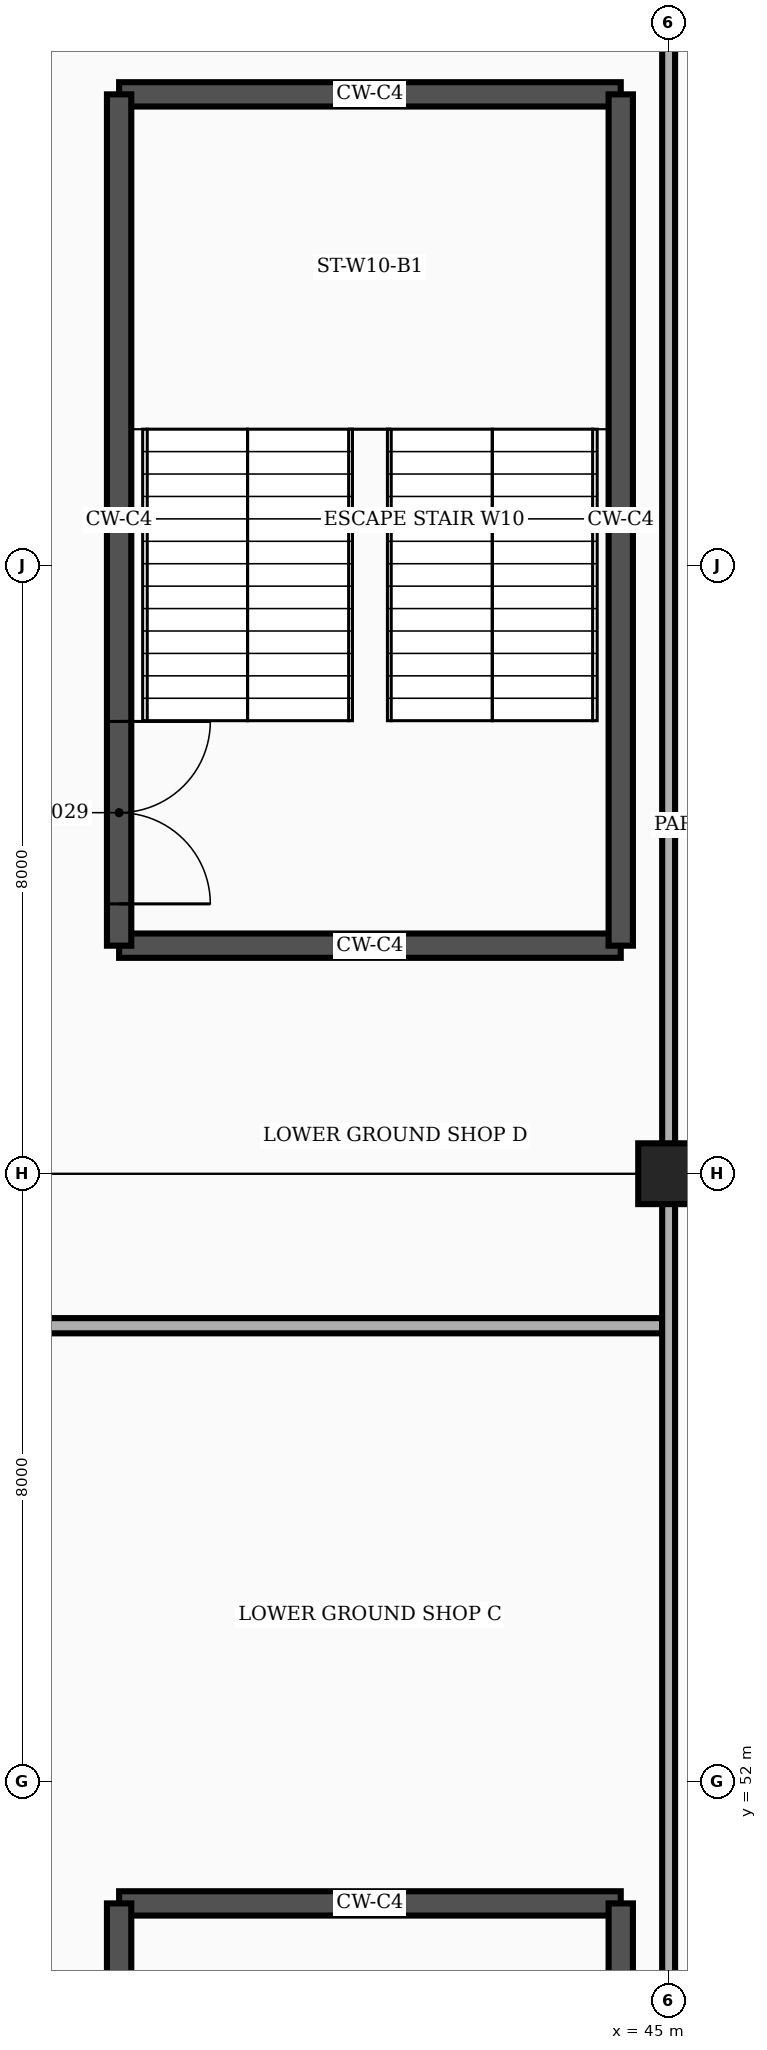
"""IFC4 building model, lengths in metres.
Left out: names, types, materials, properties, quantities, classifications, styles, units other than length and angle.
Written with IfcOpenShell. Run it as: python <this file> out.ifc"""

import sys

from ifc_helpers import new_model, si_unit, direction, frame, frame_2d, origin, origin_2d, place, context, subcontext, project, spatial, rectangle, extrude, element, fill, save


model = new_model("IFC4")
c1 = context("Model", 3, precision=1e-05, world=origin(), true_north=direction((0.0, 1.0)))
c2 = subcontext(c1, "Body", "Model", "MODEL_VIEW")
j1 = project(units=[si_unit("LENGTHUNIT", "METRE"), si_unit("PLANEANGLEUNIT", "RADIAN")], contexts=[c1])
p1 = place(None, origin())
s1 = spatial("IfcSite", under=j1, at=p1, CompositionType="ELEMENT")
p2 = place(p1, origin())
s2 = spatial("IfcBuilding", under=s1, at=p2, CompositionType="ELEMENT")
p3 = place(p2, frame((0.0, 0.0, -4.5)))
s3 = spatial("IfcBuildingStorey", under=s2, at=p3, CompositionType="ELEMENT", Elevation=-4.5)
p4 = place(p3, frame((45.0, 60.0, -0.45), z_axis=(0.0, 0.0, 1.0), x_axis=(1.0, 0.0, 0.0)))
e1 = element("IfcColumn", 1, at=p4, inside=s3, PredefinedType="COLUMN", context=c2, shape_type="SweptSolid", body=[
    extrude(rectangle(XDim=0.8, YDim=0.8, at=origin_2d()), origin(), (0.0, 0.0, 1.0), 4.95),
])
p5 = place(p3, frame((37.77, 50.4, 0.0), z_axis=(0.0, 0.0, 1.0), x_axis=(1.0, 0.0, 0.0)))
e2 = element("IfcWall", 2, at=p5, inside=s3, PredefinedType="SHEAR", context=c2, shape_type="SweptSolid", body=[
    extrude(rectangle(XDim=6.6, YDim=0.32, at=frame_2d((3.3, 0.0))), origin(), (0.0, 0.0, 1.0), 4.24),
])
p6 = place(p3, frame((37.77, 39.2, 0.0), z_axis=(0.0, 0.0, 1.0), x_axis=(0.0, 1.0, 0.0)))
e3 = element("IfcWall", 3, at=p6, inside=s3, PredefinedType="SHEAR", context=c2, shape_type="SweptSolid", body=[
    extrude(rectangle(XDim=11.2, YDim=0.32, at=frame_2d((5.6, 0.0))), origin(), (0.0, 0.0, 1.0), 4.24),
])
p7 = place(p6, frame((0.55, 0.0, 0.0)))
e4 = element("IfcOpeningElement", 4, at=p7, cuts=e3, PredefinedType="OPENING", context=c2, shape_type="SweptSolid", body=[
    extrude(rectangle(XDim=2.4, YDim=2.25, at=frame_2d((1.2, 1.125))), frame((0.0, 0.172, 0.0), z_axis=(0.0, -1.0, 0.0), x_axis=(1.0, 0.0, 0.0)), (0.0, 0.0, 1.0), 0.344),
])
p8 = place(p3, frame((44.37, 39.2, 0.0), z_axis=(0.0, 0.0, 1.0), x_axis=(0.0, 1.0, 0.0)))
e5 = element("IfcWall", 5, at=p8, inside=s3, PredefinedType="SHEAR", context=c2, shape_type="SweptSolid", body=[
    extrude(rectangle(XDim=11.2, YDim=0.32, at=frame_2d((5.6, 0.0))), origin(), (0.0, 0.0, 1.0), 4.24),
])
for number, where, z_axis, x_axis in (
    (6, (37.77, 63.0, 0.0), (0.0, 0.0, 1.0), (1.0, 0.0, 0.0)),
    (7, (37.77, 74.2, 0.0), (0.0, 0.0, 1.0), (1.0, 0.0, 0.0)),
):
    element("IfcWall", number, at=place(p3, frame(where, z_axis=z_axis, x_axis=x_axis)), inside=s3, PredefinedType="SHEAR", context=c2, shape_type="SweptSolid", body=[
        extrude(rectangle(XDim=6.6, YDim=0.32, at=frame_2d((3.3, 0.0))), origin(), (0.0, 0.0, 1.0), 4.24),
    ])
p9 = place(p3, frame((37.77, 63.0, 0.0), z_axis=(0.0, 0.0, 1.0), x_axis=(0.0, 1.0, 0.0)))
e8 = element("IfcWall", 8, at=p9, inside=s3, PredefinedType="SHEAR", context=c2, shape_type="SweptSolid", body=[
    extrude(rectangle(XDim=11.2, YDim=0.32, at=frame_2d((5.6, 0.0))), origin(), (0.0, 0.0, 1.0), 4.24),
])
p10 = place(p9, frame((0.55, 0.0, 0.0)))
e9 = element("IfcOpeningElement", 9, at=p10, cuts=e8, PredefinedType="OPENING", context=c2, shape_type="SweptSolid", body=[
    extrude(rectangle(XDim=2.4, YDim=2.25, at=frame_2d((1.2, 1.125))), frame((0.0, 0.172, 0.0), z_axis=(0.0, -1.0, 0.0), x_axis=(1.0, 0.0, 0.0)), (0.0, 0.0, 1.0), 0.344),
])
p11 = place(p3, frame((44.37, 63.0, 0.0), z_axis=(0.0, 0.0, 1.0), x_axis=(0.0, 1.0, 0.0)))
e10 = element("IfcWall", 10, at=p11, inside=s3, PredefinedType="SHEAR", context=c2, shape_type="SweptSolid", body=[
    extrude(rectangle(XDim=11.2, YDim=0.32, at=frame_2d((5.6, 0.0))), origin(), (0.0, 0.0, 1.0), 4.24),
])
p12 = place(p3, frame((26.56, 58.0, 0.0), z_axis=(0.0, 0.0, 1.0), x_axis=(1.0, 0.0, 0.0)))
e11 = element("IfcWall", 11, at=p12, inside=s3, PredefinedType="PARTITIONING", context=c2, shape_type="SweptSolid", body=[
    extrude(rectangle(XDim=18.355, YDim=0.2, at=frame_2d((9.177, 0.0))), origin(), (0.0, 0.0, 1.0), 4.24),
])
for number, where, z_axis, x_axis in (
    (12, (45.0, 36.22, 0.0), (0.0, 0.0, 1.0), (0.0, 1.0, 0.0)),
    (13, (45.0, 60.22, 0.0), (0.0, 0.0, 1.0), (0.0, 1.0, 0.0)),
):
    element("IfcWall", number, at=place(p3, frame(where, z_axis=z_axis, x_axis=x_axis)), inside=s3, PredefinedType="PARTITIONING", context=c2, shape_type="SweptSolid", body=[
        extrude(rectangle(XDim=23.56, YDim=0.17, at=frame_2d((11.78, 0.0))), origin(), (0.0, 0.0, 1.0), 3.556),
    ])
p13 = place(p10, frame((2.4, 0.0, 0.0), z_axis=(0.0, 0.0, 1.0), x_axis=(-1.0, 0.0, 0.0)))
e14 = element("IfcDoor", 14, at=p13, inside=s3, OperationType="DOUBLE_DOOR_SINGLE_SWING", PredefinedType="DOOR", context=c2, shape_type="SweptSolid", body=[
    extrude(rectangle(XDim=2.4, YDim=2.25, at=frame_2d((1.2, 1.125))), frame((0.0, 0.025, 0.0), z_axis=(0.0, -1.0, 0.0), x_axis=(1.0, 0.0, 0.0)), (0.0, 0.0, 1.0), 0.05),
])
fill(e9, e14)
save(model, sys.argv[1])
